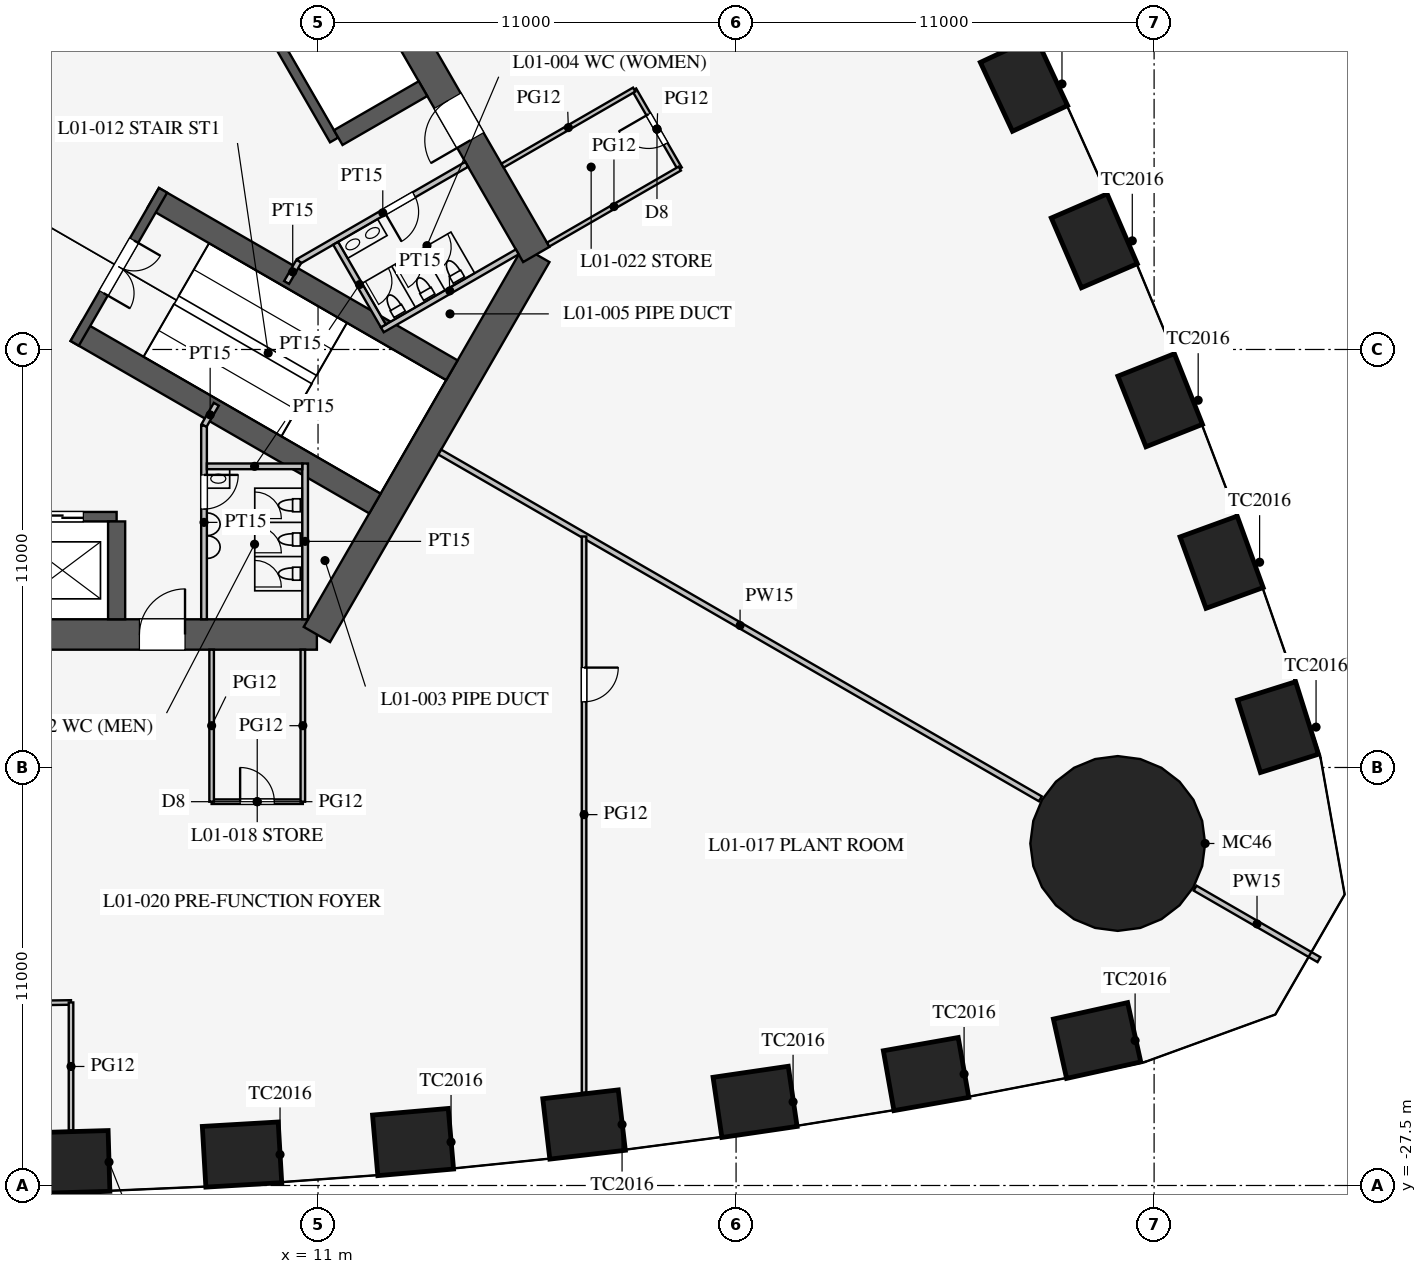
"""IFC4 building model, lengths in metres.
Left out: names, types, materials, properties, quantities, classifications, styles, units other than length and angle.
Written with IfcOpenShell. Run it as: python <this file> out.ifc"""

import sys

from ifc_helpers import new_model, si_unit, direction, frame, frame_2d, origin, origin_2d, place, context, subcontext, project, spatial, rectangle, circle, extrude, element, fill, save


model = new_model("IFC4")
c1 = context("Model", 3, precision=1e-05, world=origin(), true_north=direction((0.0, 1.0)))
c2 = subcontext(c1, "Body", "Model", "MODEL_VIEW")
j1 = project(units=[si_unit("LENGTHUNIT", "METRE"), si_unit("PLANEANGLEUNIT", "RADIAN")], contexts=[c1])
p1 = place(None, origin())
s1 = spatial("IfcSite", under=j1, at=p1, CompositionType="ELEMENT")
p2 = place(p1, origin())
s2 = spatial("IfcBuilding", under=s1, at=p2, CompositionType="ELEMENT")
p3 = place(p2, frame((0.0, 0.0, 6.5)))
s3 = spatial("IfcBuildingStorey", under=s2, at=p3, CompositionType="ELEMENT", Elevation=6.5)
for number, where, z_axis, x_axis in (
    (1, (4.5, -26.883, 0.0), (0.0, 0.0, 1.0), (1.0, 0.029, 0.0)),
    (2, (9.0, -26.686, 0.0), (0.0, 0.0, 1.0), (0.998, 0.058, 0.0)),
    (3, (13.5, -26.357, 0.0), (0.0, 0.0, 1.0), (0.996, 0.087, 0.0)),
    (4, (18.0, -25.895, 0.0), (0.0, 0.0, 1.0), (0.993, 0.116, 0.0)),
    (5, (22.5, -25.299, 0.0), (0.0, 0.0, 1.0), (0.989, 0.145, 0.0)),
    (6, (27.0, -24.568, 0.0), (0.0, 0.0, 1.0), (0.985, 0.174, 0.0)),
    (7, (31.5, -23.685, 0.0), (0.0, 0.0, 1.0), (0.976, 0.217, 0.0)),
    (8, (36.262, -15.438, 0.0), (0.0, 0.0, 1.0), (-0.3, 0.954, 0.0)),
    (9, (34.776, -11.099, 0.0), (0.0, 0.0, 1.0), (-0.342, 0.94, 0.0)),
    (10, (33.16, -6.836, 0.0), (0.0, 0.0, 1.0), (-0.369, 0.929, 0.0)),
    (11, (31.426, -2.641, 0.0), (0.0, 0.0, 1.0), (-0.396, 0.918, 0.0)),
    (12, (29.576, 1.487, 0.0), (0.0, 0.0, 1.0), (-0.423, 0.906, 0.0)),
):
    element("IfcColumn", number, at=place(p3, frame(where, z_axis=z_axis, x_axis=x_axis)), inside=s3, PredefinedType="COLUMN", context=c2, shape_type="SweptSolid", body=[
        extrude(rectangle(XDim=2.0, YDim=1.6, at=origin_2d()), origin(), (0.0, 0.0, 1.0), 5.0),
    ])
p4 = place(p3, frame((32.043, -18.5, 0.0), z_axis=(0.0, 0.0, 1.0), x_axis=(1.0, 0.0, 0.0)))
e13 = element("IfcColumn", 13, at=p4, inside=s3, PredefinedType="COLUMN", context=c2, shape_type="SweptSolid", body=[
    extrude(circle(Radius=2.3, at=origin_2d()), origin(), (0.0, 0.0, 1.0), 5.0),
])
p5 = place(p3, frame((-10.97, -13.0, 0.0), z_axis=(0.0, 0.0, 1.0), x_axis=(1.0, 0.0, 0.0)))
e14 = element("IfcWall", 14, at=p5, inside=s3, PredefinedType="SHEAR", context=c2, shape_type="SweptSolid", body=[
    extrude(rectangle(XDim=21.939, YDim=0.8, at=frame_2d((10.97, 0.0))), origin(), (0.0, 0.0, 1.0), 5.0),
])
p6 = place(p5, frame((17.27, 0.0, 0.0)))
e15 = element("IfcOpeningElement", 15, at=p6, cuts=e14, PredefinedType="OPENING", context=c2, shape_type="SweptSolid", body=[
    extrude(rectangle(XDim=1.2, YDim=2.1, at=frame_2d((0.6, 1.05))), frame((0.0, 0.41, 0.0), z_axis=(0.0, -1.0, 0.0), x_axis=(1.0, 0.0, 0.0)), (0.0, 0.0, 1.0), 0.82),
])
p7 = place(p5, frame((3.47, 0.0, 0.0)))
e16 = element("IfcOpeningElement", 16, at=p7, cuts=e14, PredefinedType="OPENING", context=c2, shape_type="SweptSolid", body=[
    extrude(rectangle(XDim=1.2, YDim=2.1, at=frame_2d((0.6, 1.05))), frame((0.0, 0.41, 0.0), z_axis=(0.0, -1.0, 0.0), x_axis=(1.0, 0.0, 0.0)), (0.0, 0.0, 1.0), 0.82),
])
p8 = place(p3, frame((10.97, -13.0, 0.0), z_axis=(0.0, 0.0, 1.0), x_axis=(0.499995765644, 0.866027848477, 0.0)))
e17 = element("IfcWall", 17, at=p8, inside=s3, PredefinedType="SHEAR", context=c2, shape_type="SweptSolid", body=[
    extrude(rectangle(XDim=11.547, YDim=0.8, at=frame_2d((5.773, 0.0))), origin(), (0.0, 0.0, 1.0), 5.0),
])
p9 = place(p3, frame((16.743, -3.0, 0.0), z_axis=(0.0, 0.0, 1.0), x_axis=(-0.500002442456, 0.866023993627, 0.0)))
e18 = element("IfcWall", 18, at=p9, inside=s3, PredefinedType="SHEAR", context=c2, shape_type="SweptSolid", body=[
    extrude(rectangle(XDim=21.939, YDim=0.8, at=frame_2d((10.97, 0.0))), origin(), (0.0, 0.0, 1.0), 5.0),
])
p10 = place(p9, frame((17.27, 0.0, 0.0)))
e19 = element("IfcOpeningElement", 19, at=p10, cuts=e18, PredefinedType="OPENING", context=c2, shape_type="SweptSolid", body=[
    extrude(rectangle(XDim=1.2, YDim=2.1, at=frame_2d((0.6, 1.05))), frame((0.0, 0.41, 0.0), z_axis=(0.0, -1.0, 0.0), x_axis=(1.0, 0.0, 0.0)), (0.0, 0.0, 1.0), 0.82),
])
p11 = place(p9, frame((3.47, 0.0, 0.0)))
e20 = element("IfcOpeningElement", 20, at=p11, cuts=e18, PredefinedType="OPENING", context=c2, shape_type="SweptSolid", body=[
    extrude(rectangle(XDim=1.2, YDim=2.1, at=frame_2d((0.6, 1.05))), frame((0.0, 0.41, 0.0), z_axis=(0.0, -1.0, 0.0), x_axis=(1.0, 0.0, 0.0)), (0.0, 0.0, 1.0), 0.82),
])
p12 = place(p3, frame((-5.7, -9.9, 0.0), z_axis=(0.0, 0.0, 1.0), x_axis=(1.0, 0.0, 0.0)))
e21 = element("IfcWall", 21, at=p12, inside=s3, PredefinedType="SHEAR", context=c2, shape_type="SweptSolid", body=[
    extrude(rectangle(XDim=11.4, YDim=0.25, at=frame_2d((5.7, 0.0))), origin(), (0.0, 0.0, 1.0), 5.0),
])
p13 = place(p12, frame((0.875, 0.0, 0.0)))
e22 = element("IfcOpeningElement", 22, at=p13, cuts=e21, PredefinedType="OPENING", context=c2, shape_type="SweptSolid", body=[
    extrude(rectangle(XDim=1.1, YDim=2.2, at=frame_2d((0.55, 1.1))), frame((0.0, 0.135, 0.0), z_axis=(0.0, -1.0, 0.0), x_axis=(1.0, 0.0, 0.0)), (0.0, 0.0, 1.0), 0.27),
])
p14 = place(p12, frame((3.725, 0.0, 0.0)))
e23 = element("IfcOpeningElement", 23, at=p14, cuts=e21, PredefinedType="OPENING", context=c2, shape_type="SweptSolid", body=[
    extrude(rectangle(XDim=1.1, YDim=2.2, at=frame_2d((0.55, 1.1))), frame((0.0, 0.135, 0.0), z_axis=(0.0, -1.0, 0.0), x_axis=(1.0, 0.0, 0.0)), (0.0, 0.0, 1.0), 0.27),
])
p15 = place(p12, frame((6.575, 0.0, 0.0)))
e24 = element("IfcOpeningElement", 24, at=p15, cuts=e21, PredefinedType="OPENING", context=c2, shape_type="SweptSolid", body=[
    extrude(rectangle(XDim=1.1, YDim=2.2, at=frame_2d((0.55, 1.1))), frame((0.0, 0.135, 0.0), z_axis=(0.0, -1.0, 0.0), x_axis=(1.0, 0.0, 0.0)), (0.0, 0.0, 1.0), 0.27),
])
p16 = place(p12, frame((9.425, 0.0, 0.0)))
e25 = element("IfcOpeningElement", 25, at=p16, cuts=e21, PredefinedType="OPENING", context=c2, shape_type="SweptSolid", body=[
    extrude(rectangle(XDim=1.1, YDim=2.2, at=frame_2d((0.55, 1.1))), frame((0.0, 0.135, 0.0), z_axis=(0.0, -1.0, 0.0), x_axis=(1.0, 0.0, 0.0)), (0.0, 0.0, 1.0), 0.27),
])
p17 = place(p3, frame((5.7, -10.025, 0.0), z_axis=(0.0, 0.0, 1.0), x_axis=(0.0, -1.0, 0.0)))
e26 = element("IfcWall", 26, at=p17, inside=s3, PredefinedType="SHEAR", context=c2, shape_type="SweptSolid", body=[
    extrude(rectangle(XDim=2.575, YDim=0.45, at=frame_2d((1.288, 0.0))), origin(), (0.0, 0.0, 1.0), 5.0),
])
p18 = place(p3, frame((11.424, 0.014, 0.0), z_axis=(0.0, 0.0, 1.0), x_axis=(-0.500001763848, 0.866024385424, 0.0)))
e27 = element("IfcWall", 27, at=p18, inside=s3, PredefinedType="SHEAR", context=c2, shape_type="SweptSolid", body=[
    extrude(rectangle(XDim=11.4, YDim=0.25, at=frame_2d((5.7, 0.0))), origin(), (0.0, 0.0, 1.0), 5.0),
])
p19 = place(p3, frame((11.532, 0.076, 0.0), z_axis=(0.0, 0.0, 1.0), x_axis=(0.866005588531, 0.500034319456, 0.0)))
e28 = element("IfcWall", 28, at=p19, inside=s3, PredefinedType="SHEAR", context=c2, shape_type="SweptSolid", body=[
    extrude(rectangle(XDim=2.575, YDim=0.45, at=frame_2d((1.288, 0.0))), origin(), (0.0, 0.0, 1.0), 5.0),
])
for number, where, z_axis, x_axis in (
    (29, (4.638, -5.016, 0.0), (0.0, 0.0, 1.0), (0.866, -0.5, 0.0)),
    (30, (6.663, -1.509, 0.0), (0.0, 0.0, 1.0), (0.866, -0.5, 0.0)),
):
    element("IfcWall", number, at=place(p3, frame(where, z_axis=z_axis, x_axis=x_axis)), inside=s3, PredefinedType="SHEAR", context=c2, shape_type="SweptSolid", body=[
        extrude(rectangle(XDim=9.075, YDim=0.6, at=frame_2d((4.538, 0.0))), origin(), (0.0, 0.0, 1.0), 5.0),
    ])
p20 = place(p3, frame((4.597, -5.339, 0.0), z_axis=(0.0, 0.0, 1.0), x_axis=(0.499984536904, 0.866034331223, 0.0)))
e31 = element("IfcWall", 31, at=p20, inside=s3, PredefinedType="SHEAR", context=c2, shape_type="SweptSolid", body=[
    extrude(rectangle(XDim=4.65, YDim=0.25, at=frame_2d((2.325, 0.0))), origin(), (0.0, 0.0, 1.0), 5.0),
])
p21 = place(p20, frame((1.525, 0.0, 0.0)))
e32 = element("IfcOpeningElement", 32, at=p21, cuts=e31, PredefinedType="OPENING", context=c2, shape_type="SweptSolid", body=[
    extrude(rectangle(XDim=1.6, YDim=2.1, at=frame_2d((0.8, 1.05))), frame((0.0, 0.135, 0.0), z_axis=(0.0, -1.0, 0.0), x_axis=(1.0, 0.0, 0.0)), (0.0, 0.0, 1.0), 0.27),
])
p22 = place(p3, frame((8.0, -7.5, 0.0), z_axis=(0.0, 0.0, 1.0), x_axis=(0.0, -1.0, 0.0)))
e33 = element("IfcWall", 33, at=p22, inside=s3, PredefinedType="PARTITIONING", context=c2, shape_type="SweptSolid", body=[
    extrude(rectangle(XDim=5.1, YDim=0.15, at=frame_2d((2.55, 0.0))), origin(), (0.0, 0.0, 1.0), 4.8),
])
p23 = place(p22, frame((1.3, 0.0, 0.0)))
e34 = element("IfcOpeningElement", 34, at=p23, cuts=e33, PredefinedType="OPENING", context=c2, shape_type="SweptSolid", body=[
    extrude(rectangle(XDim=0.9, YDim=2.1, at=frame_2d((0.45, 1.05))), frame((0.0, 0.085, 0.0), z_axis=(0.0, -1.0, 0.0), x_axis=(1.0, 0.0, 0.0)), (0.0, 0.0, 1.0), 0.17),
])
p24 = place(p3, frame((10.495, -3.178, 0.0), z_axis=(0.0, 0.0, 1.0), x_axis=(0.86602216432, 0.500005610874, 0.0)))
e35 = element("IfcWall", 35, at=p24, inside=s3, PredefinedType="PARTITIONING", context=c2, shape_type="SweptSolid", body=[
    extrude(rectangle(XDim=5.1, YDim=0.15, at=frame_2d((2.55, 0.0))), origin(), (0.0, 0.0, 1.0), 4.8),
])
p25 = place(p24, frame((2.6, 0.0, 0.0)))
e36 = element("IfcOpeningElement", 36, at=p25, cuts=e35, PredefinedType="OPENING", context=c2, shape_type="SweptSolid", body=[
    extrude(rectangle(XDim=0.9, YDim=2.1, at=frame_2d((0.45, 1.05))), frame((0.0, 0.085, 0.0), z_axis=(0.0, -1.0, 0.0), x_axis=(1.0, 0.0, 0.0)), (0.0, 0.0, 1.0), 0.17),
])
for number, where, z_axis, x_axis in (
    (37, (8.0, -7.5, 0.0), (0.0, 0.0, 1.0), (0.5, 0.866, 0.0)),
    (38, (10.495, -3.178, 0.0), (0.0, 0.0, 1.0), (-0.5, -0.866, 0.0)),
):
    element("IfcWall", number, at=place(p3, frame(where, z_axis=z_axis, x_axis=x_axis)), inside=s3, PredefinedType="PARTITIONING", context=c2, shape_type="SweptSolid", body=[
        extrude(rectangle(XDim=0.645, YDim=0.15, at=frame_2d((0.323, 0.0))), origin(), (0.0, 0.0, 1.0), 4.8),
    ])
p26 = place(p3, frame((10.66, -8.5, 0.0), z_axis=(0.0, 0.0, 1.0), x_axis=(0.0, -1.0, 0.0)))
e39 = element("IfcWall", 39, at=p26, inside=s3, PredefinedType="PARTITIONING", context=c2, shape_type="SweptSolid", body=[
    extrude(rectangle(XDim=4.1, YDim=0.15, at=frame_2d((2.05, 0.0))), origin(), (0.0, 0.0, 1.0), 4.8),
])
p27 = place(p3, frame((8.075, -8.575, 0.0), z_axis=(0.0, 0.0, 1.0), x_axis=(1.0, 0.0, 0.0)))
e40 = element("IfcWall", 40, at=p27, inside=s3, PredefinedType="PARTITIONING", context=c2, shape_type="SweptSolid", body=[
    extrude(rectangle(XDim=2.51, YDim=0.15, at=frame_2d((1.255, 0.0))), origin(), (0.0, 0.0, 1.0), 4.8),
])
p28 = place(p3, frame((12.691, -4.982, 0.0), z_axis=(0.0, 0.0, 1.0), x_axis=(0.8660249478, 0.500000789788, 0.0)))
e41 = element("IfcWall", 41, at=p28, inside=s3, PredefinedType="PARTITIONING", context=c2, shape_type="SweptSolid", body=[
    extrude(rectangle(XDim=4.1, YDim=0.15, at=frame_2d((2.05, 0.0))), origin(), (0.0, 0.0, 1.0), 4.8),
])
p29 = place(p3, frame((11.464, -2.706, 0.0), z_axis=(0.0, 0.0, 1.0), x_axis=(0.50001992892, -0.866013897511, 0.0)))
e42 = element("IfcWall", 42, at=p29, inside=s3, PredefinedType="PARTITIONING", context=c2, shape_type="SweptSolid", body=[
    extrude(rectangle(XDim=2.51, YDim=0.15, at=frame_2d((1.255, 0.0))), origin(), (0.0, 0.0, 1.0), 4.8),
])
p30 = place(p3, frame((14.203, -8.2, 0.0), z_axis=(0.0, 0.0, 1.0), x_axis=(0.866024965723, -0.500000758745, 0.0)))
e43 = element("IfcWall", 43, at=p30, inside=s3, PredefinedType="PARTITIONING", context=c2, shape_type="SweptSolid", body=[
    extrude(rectangle(XDim=18.25, YDim=0.15, at=frame_2d((9.125, 0.0))), origin(), (0.0, 0.0, 1.0), 3.1),
])
p31 = place(p3, frame((34.078, -19.675, 0.0), z_axis=(0.0, 0.0, 1.0), x_axis=(0.866019247219, -0.500010663332, 0.0)))
e44 = element("IfcWall", 44, at=p31, inside=s3, PredefinedType="PARTITIONING", context=c2, shape_type="SweptSolid", body=[
    extrude(rectangle(XDim=3.764, YDim=0.15, at=frame_2d((1.882, 0.0))), origin(), (0.0, 0.0, 1.0), 3.1),
])
p32 = place(p3, frame((8.2, -17.4, 0.0), z_axis=(0.0, 0.0, 1.0), x_axis=(1.0, 0.0, 0.0)))
e45 = element("IfcWall", 45, at=p32, inside=s3, PredefinedType="PARTITIONING", context=c2, shape_type="SweptSolid", body=[
    extrude(rectangle(XDim=2.4, YDim=0.12, at=frame_2d((1.2, 0.0))), origin(), (0.0, 0.0, 1.0), 3.6),
])
p33 = place(p32, frame((0.75, 0.0, 0.0)))
e46 = element("IfcOpeningElement", 46, at=p33, cuts=e45, PredefinedType="OPENING", context=c2, shape_type="SweptSolid", body=[
    extrude(rectangle(XDim=0.9, YDim=2.1, at=frame_2d((0.45, 1.05))), frame((0.0, 0.07, 0.0), z_axis=(0.0, -1.0, 0.0), x_axis=(1.0, 0.0, 0.0)), (0.0, 0.0, 1.0), 0.14),
])
for number, where, z_axis, x_axis in (
    (47, (10.6, -13.4, 0.0), (0.0, 0.0, 1.0), (0.0, -1.0, 0.0)),
    (48, (8.2, -13.4, 0.0), (0.0, 0.0, 1.0), (0.0, -1.0, 0.0)),
):
    element("IfcWall", number, at=place(p3, frame(where, z_axis=z_axis, x_axis=x_axis)), inside=s3, PredefinedType="PARTITIONING", context=c2, shape_type="SweptSolid", body=[
        extrude(rectangle(XDim=4.0, YDim=0.12, at=frame_2d((2.0, 0.0))), origin(), (0.0, 0.0, 1.0), 3.6),
    ])
p34 = place(p3, frame((0.0, -22.749, 0.0), z_axis=(0.0, 0.0, 1.0), x_axis=(0.999894311967, 0.014538393859, 0.0)))
e49 = element("IfcWall", 49, at=p34, inside=s3, PredefinedType="PARTITIONING", context=c2, shape_type="SweptSolid", body=[
    extrude(rectangle(XDim=4.5, YDim=0.12, at=frame_2d((2.25, 0.0))), origin(), (0.0, 0.0, 1.0), 3.6),
])
p35 = place(p34, frame((1.8, 0.0, 0.0)))
e50 = element("IfcOpeningElement", 50, at=p35, cuts=e49, PredefinedType="OPENING", context=c2, shape_type="SweptSolid", body=[
    extrude(rectangle(XDim=0.9, YDim=2.1, at=frame_2d((0.45, 1.05))), frame((0.0, 0.07, 0.0), z_axis=(0.0, -1.0, 0.0), x_axis=(1.0, 0.0, 0.0)), (0.0, 0.0, 1.0), 0.14),
])
p36 = place(p3, frame((18.0, -10.421, 0.0), z_axis=(0.0, 0.0, 1.0), x_axis=(0.0, -1.0, 0.0)))
e51 = element("IfcWall", 51, at=p36, inside=s3, PredefinedType="PARTITIONING", context=c2, shape_type="SweptSolid", body=[
    extrude(rectangle(XDim=14.638, YDim=0.12, at=frame_2d((7.319, 0.0))), origin(), (0.0, 0.0, 1.0), 3.6),
])
p37 = place(p36, frame((3.45, 0.0, 0.0)))
e52 = element("IfcOpeningElement", 52, at=p37, cuts=e51, PredefinedType="OPENING", context=c2, shape_type="SweptSolid", body=[
    extrude(rectangle(XDim=0.9, YDim=2.1, at=frame_2d((0.45, 1.05))), frame((0.0, 0.07, 0.0), z_axis=(0.0, -1.0, 0.0), x_axis=(1.0, 0.0, 0.0)), (0.0, 0.0, 1.0), 0.14),
])
p38 = place(p3, frame((4.5, -22.683, 0.0), z_axis=(0.0, 0.0, 1.0), x_axis=(0.0, -1.0, 0.0)))
e53 = element("IfcWall", 53, at=p38, inside=s3, PredefinedType="PARTITIONING", context=c2, shape_type="SweptSolid", body=[
    extrude(rectangle(XDim=3.369, YDim=0.12, at=frame_2d((1.685, 0.0))), origin(), (0.0, 0.0, 1.0), 3.6),
])
p39 = place(p3, frame((20.519, -0.74, 0.0), z_axis=(0.0, 0.0, 1.0), x_axis=(-0.499957262057, 0.866050077142, 0.0)))
e54 = element("IfcWall", 54, at=p39, inside=s3, PredefinedType="PARTITIONING", context=c2, shape_type="SweptSolid", body=[
    extrude(rectangle(XDim=2.4, YDim=0.12, at=frame_2d((1.2, 0.0))), origin(), (0.0, 0.0, 1.0), 3.6),
])
p40 = place(p39, frame((0.75, 0.0, 0.0)))
e55 = element("IfcOpeningElement", 55, at=p40, cuts=e54, PredefinedType="OPENING", context=c2, shape_type="SweptSolid", body=[
    extrude(rectangle(XDim=0.9, YDim=2.1, at=frame_2d((0.45, 1.05))), frame((0.0, 0.07, 0.0), z_axis=(0.0, -1.0, 0.0), x_axis=(1.0, 0.0, 0.0)), (0.0, 0.0, 1.0), 0.14),
])
for number, where, z_axis, x_axis in (
    (56, (17.055, -2.74, 0.0), (0.0, 0.0, 1.0), (0.866, 0.5, 0.0)),
    (57, (15.855, -0.661, 0.0), (0.0, 0.0, 1.0), (0.866, 0.5, 0.0)),
):
    element("IfcWall", number, at=place(p3, frame(where, z_axis=z_axis, x_axis=x_axis)), inside=s3, PredefinedType="PARTITIONING", context=c2, shape_type="SweptSolid", body=[
        extrude(rectangle(XDim=4.0, YDim=0.12, at=frame_2d((2.0, 0.0))), origin(), (0.0, 0.0, 1.0), 3.6),
    ])
p41 = place(p23, origin())
e58 = element("IfcDoor", 58, at=p41, inside=s3, OperationType="SINGLE_SWING_LEFT", PredefinedType="DOOR", context=c2, shape_type="SweptSolid", body=[
    extrude(rectangle(XDim=0.9, YDim=2.1, at=frame_2d((0.45, 1.05))), frame((0.0, 0.025, 0.0), z_axis=(0.0, -1.0, 0.0), x_axis=(1.0, 0.0, 0.0)), (0.0, 0.0, 1.0), 0.05),
])
fill(e34, e58)
p42 = place(p25, frame((0.9, 0.0, 0.0), z_axis=(0.0, 0.0, 1.0), x_axis=(-1.0, 0.0, 0.0)))
e59 = element("IfcDoor", 59, at=p42, inside=s3, OperationType="SINGLE_SWING_RIGHT", PredefinedType="DOOR", context=c2, shape_type="SweptSolid", body=[
    extrude(rectangle(XDim=0.9, YDim=2.1, at=frame_2d((0.45, 1.05))), frame((0.0, 0.025, 0.0), z_axis=(0.0, -1.0, 0.0), x_axis=(1.0, 0.0, 0.0)), (0.0, 0.0, 1.0), 0.05),
])
fill(e36, e59)
p43 = place(p21, frame((1.6, 0.0, 0.0), z_axis=(0.0, 0.0, 1.0), x_axis=(-1.0, 0.0, 0.0)))
e60 = element("IfcDoor", 60, at=p43, inside=s3, OperationType="DOUBLE_DOOR_SINGLE_SWING", PredefinedType="DOOR", context=c2, shape_type="SweptSolid", body=[
    extrude(rectangle(XDim=1.6, YDim=2.1, at=frame_2d((0.8, 1.05))), frame((0.0, 0.025, 0.0), z_axis=(0.0, -1.0, 0.0), x_axis=(1.0, 0.0, 0.0)), (0.0, 0.0, 1.0), 0.05),
])
fill(e32, e60)
p44 = place(p6, origin())
e61 = element("IfcDoor", 61, at=p44, inside=s3, OperationType="SINGLE_SWING_RIGHT", PredefinedType="DOOR", context=c2, shape_type="SweptSolid", body=[
    extrude(rectangle(XDim=1.2, YDim=2.1, at=frame_2d((0.6, 1.05))), frame((0.0, 0.025, 0.0), z_axis=(0.0, -1.0, 0.0), x_axis=(1.0, 0.0, 0.0)), (0.0, 0.0, 1.0), 0.05),
])
fill(e15, e61)
p45 = place(p11, origin())
e62 = element("IfcDoor", 62, at=p45, inside=s3, OperationType="SINGLE_SWING_LEFT", PredefinedType="DOOR", context=c2, shape_type="SweptSolid", body=[
    extrude(rectangle(XDim=1.2, YDim=2.1, at=frame_2d((0.6, 1.05))), frame((0.0, 0.025, 0.0), z_axis=(0.0, -1.0, 0.0), x_axis=(1.0, 0.0, 0.0)), (0.0, 0.0, 1.0), 0.05),
])
fill(e20, e62)
p46 = place(p37, origin())
e63 = element("IfcDoor", 63, at=p46, inside=s3, OperationType="SINGLE_SWING_LEFT", PredefinedType="DOOR", context=c2, shape_type="SweptSolid", body=[
    extrude(rectangle(XDim=0.9, YDim=2.1, at=frame_2d((0.45, 1.05))), frame((0.0, 0.025, 0.0), z_axis=(0.0, -1.0, 0.0), x_axis=(1.0, 0.0, 0.0)), (0.0, 0.0, 1.0), 0.05),
])
fill(e52, e63)
p47 = place(p33, origin())
e64 = element("IfcDoor", 64, at=p47, inside=s3, OperationType="SINGLE_SWING_LEFT", PredefinedType="DOOR", context=c2, shape_type="SweptSolid", body=[
    extrude(rectangle(XDim=0.9, YDim=2.1, at=frame_2d((0.45, 1.05))), frame((0.0, 0.025, 0.0), z_axis=(0.0, -1.0, 0.0), x_axis=(1.0, 0.0, 0.0)), (0.0, 0.0, 1.0), 0.05),
])
fill(e46, e64)
p48 = place(p40, origin())
e65 = element("IfcDoor", 65, at=p48, inside=s3, OperationType="SINGLE_SWING_RIGHT", PredefinedType="DOOR", context=c2, shape_type="SweptSolid", body=[
    extrude(rectangle(XDim=0.9, YDim=2.1, at=frame_2d((0.45, 1.05))), frame((0.0, 0.025, 0.0), z_axis=(0.0, -1.0, 0.0), x_axis=(1.0, 0.0, 0.0)), (0.0, 0.0, 1.0), 0.05),
])
fill(e55, e65)
p49 = place(p16, origin())
e66 = element("IfcDoor", 66, at=p49, inside=s3, OperationType="DOUBLE_DOOR_SLIDING", PredefinedType="DOOR", context=c2, shape_type="SweptSolid", body=[
    extrude(rectangle(XDim=1.1, YDim=2.2, at=frame_2d((0.55, 1.1))), frame((0.0, 0.025, 0.0), z_axis=(0.0, -1.0, 0.0), x_axis=(1.0, 0.0, 0.0)), (0.0, 0.0, 1.0), 0.05),
])
fill(e25, e66)
save(model, sys.argv[1])
